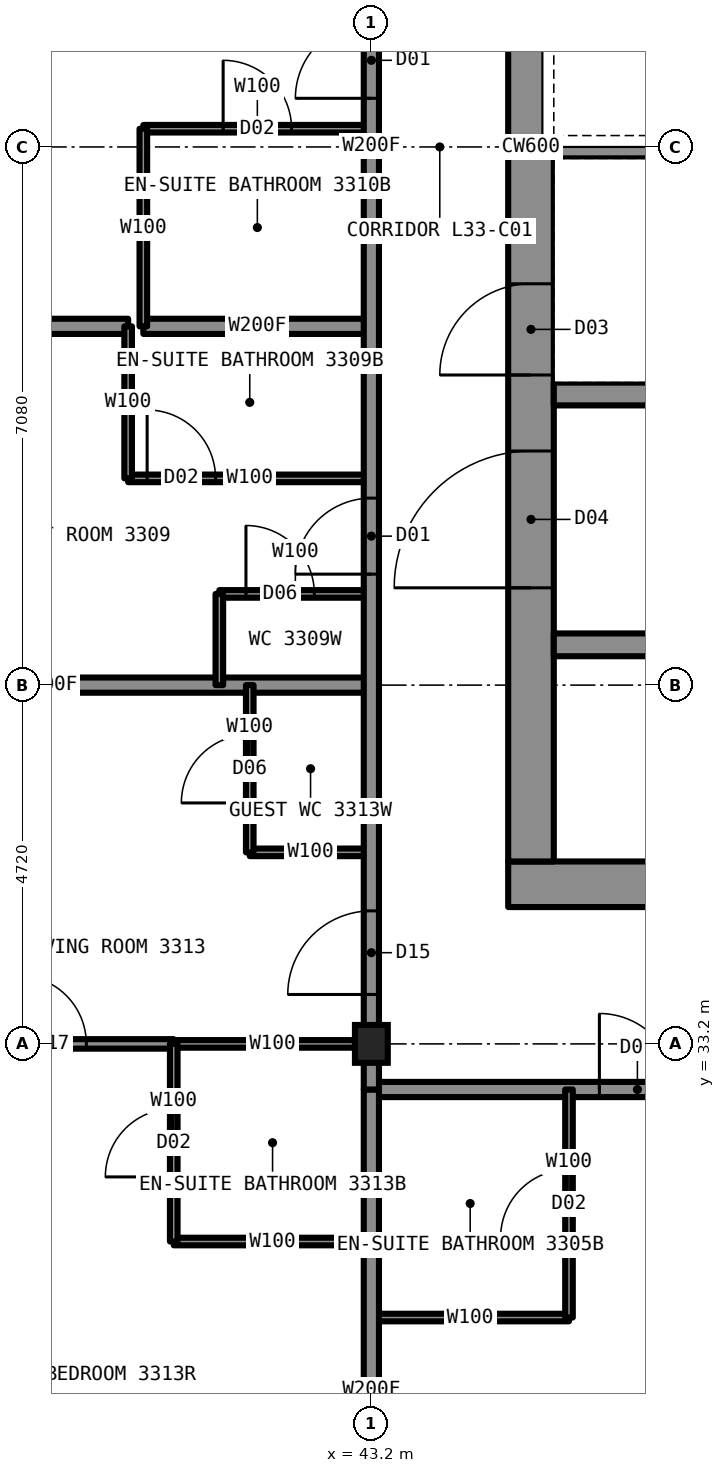
"""IFC4 building model, lengths in metres.
Left out: names, types, materials, properties, quantities, classifications, styles, units other than length and angle.
Written with IfcOpenShell. Run it as: python <this file> out.ifc"""

import sys

from ifc_helpers import new_model, si_unit, direction, frame, frame_2d, origin, origin_2d, place, context, subcontext, project, spatial, rectangle, i_section, extrude, element, fill, save


model = new_model("IFC4")
c1 = context("Model", 3, precision=1e-05, world=origin(), true_north=direction((0.0, 1.0)))
c2 = subcontext(c1, "Body", "Model", "MODEL_VIEW")
j1 = project(units=[si_unit("LENGTHUNIT", "METRE"), si_unit("PLANEANGLEUNIT", "RADIAN")], contexts=[c1])
p1 = place(None, origin())
s1 = spatial("IfcSite", under=j1, at=p1, CompositionType="ELEMENT")
p2 = place(p1, origin())
s2 = spatial("IfcBuilding", under=s1, at=p2, CompositionType="ELEMENT")
p3 = place(p2, frame((0.0, 0.0, 124.9)))
s3 = spatial("IfcBuildingStorey", under=s2, at=p3, CompositionType="ELEMENT", Elevation=124.9)
p4 = place(p3, frame((43.2, 33.2, 0.0), z_axis=(0.0, 0.0, 1.0), x_axis=(1.0, 0.0, 0.0)))
e1 = element("IfcColumn", 1, at=p4, inside=s3, PredefinedType="COLUMN", context=c2, shape_type="SweptSolid", body=[
    extrude(i_section(OverallWidth=0.432, OverallDepth=0.498, WebThickness=0.056, FlangeThickness=0.089, at=origin_2d()), origin(), (0.0, 0.0, 1.0), 3.5),
])
p5 = place(p3, frame((45.0, 35.3, 0.0), z_axis=(0.0, 0.0, 1.0), x_axis=(1.0, 0.0, 0.0)))
e2 = element("IfcWall", 2, at=p5, inside=s3, PredefinedType="SHEAR", context=c2, shape_type="SweptSolid", body=[
    extrude(rectangle(XDim=20.0, YDim=0.6, at=frame_2d((10.0, 0.0))), origin(), (0.0, 0.0, 1.0), 3.5),
])
p6 = place(p3, frame((45.3, 35.6, 0.0), z_axis=(0.0, 0.0, 1.0), x_axis=(0.0, 1.0, 0.0)))
e3 = element("IfcWall", 3, at=p6, inside=s3, PredefinedType="SHEAR", context=c2, shape_type="SweptSolid", body=[
    extrude(rectangle(XDim=18.8, YDim=0.6, at=frame_2d((9.4, 0.0))), origin(), (0.0, 0.0, 1.0), 3.5),
])
p7 = place(p6, frame((13.4, 0.0, 0.0)))
e4 = element("IfcOpeningElement", 4, at=p7, cuts=e3, PredefinedType="OPENING", context=c2, shape_type="SweptSolid", body=[
    extrude(rectangle(XDim=1.8, YDim=2.2, at=frame_2d((0.9, 1.1))), frame((0.0, 0.31, 0.0), z_axis=(0.0, -1.0, 0.0), x_axis=(1.0, 0.0, 0.0)), (0.0, 0.0, 1.0), 0.62),
])
p8 = place(p6, frame((3.6, 0.0, 0.0)))
e5 = element("IfcOpeningElement", 5, at=p8, cuts=e3, PredefinedType="OPENING", context=c2, shape_type="SweptSolid", body=[
    extrude(rectangle(XDim=1.8, YDim=2.2, at=frame_2d((0.9, 1.1))), frame((0.0, 0.31, 0.0), z_axis=(0.0, -1.0, 0.0), x_axis=(1.0, 0.0, 0.0)), (0.0, 0.0, 1.0), 0.62),
])
p9 = place(p6, frame((6.4, 0.0, 0.0)))
e6 = element("IfcOpeningElement", 6, at=p9, cuts=e3, PredefinedType="OPENING", context=c2, shape_type="SweptSolid", body=[
    extrude(rectangle(XDim=1.2, YDim=2.2, at=frame_2d((0.6, 1.1))), frame((0.0, 0.31, 0.0), z_axis=(0.0, -1.0, 0.0), x_axis=(1.0, 0.0, 0.0)), (0.0, 0.0, 1.0), 0.62),
])
p10 = place(p3, frame((45.6, 38.45, 0.0), z_axis=(0.0, 0.0, 1.0), x_axis=(1.0, 0.0, 0.0)))
e7 = element("IfcWall", 7, at=p10, inside=s3, PredefinedType="SHEAR", context=c2, shape_type="SweptSolid", body=[
    extrude(rectangle(XDim=18.8, YDim=0.3, at=frame_2d((9.4, 0.0))), origin(), (0.0, 0.0, 1.0), 3.5),
])
p11 = place(p3, frame((45.6, 41.75, 0.0), z_axis=(0.0, 0.0, 1.0), x_axis=(1.0, 0.0, 0.0)))
e8 = element("IfcWall", 8, at=p11, inside=s3, PredefinedType="SHEAR", context=c2, shape_type="SweptSolid", body=[
    extrude(rectangle(XDim=7.1, YDim=0.3, at=frame_2d((3.55, 0.0))), origin(), (0.0, 0.0, 1.0), 3.5),
])
p12 = place(p3, frame((45.6, 45.0, 0.0), z_axis=(0.0, 0.0, 1.0), x_axis=(1.0, 0.0, 0.0)))
e9 = element("IfcWall", 9, at=p12, inside=s3, PredefinedType="SHEAR", context=c2, shape_type="SweptSolid", body=[
    extrude(rectangle(XDim=6.8, YDim=0.3, at=frame_2d((3.4, 0.0))), origin(), (0.0, 0.0, 1.0), 3.5),
])
p13 = place(p3, frame((40.6, 33.2, 0.0), z_axis=(0.0, 0.0, 1.0), x_axis=(1.0, 0.0, 0.0)))
e10 = element("IfcWall", 10, at=p13, inside=s3, PredefinedType="PARTITIONING", context=c2, shape_type="SweptSolid", body=[
    extrude(rectangle(XDim=2.6, YDim=0.1, at=frame_2d((1.3, 0.0))), origin(), (0.0, 0.0, 1.0), 2.573),
])
p14 = place(p3, frame((34.7, 33.2, 0.0), z_axis=(0.0, 0.0, 1.0), x_axis=(1.0, 0.0, 0.0)))
e11 = element("IfcWall", 11, at=p14, inside=s3, PredefinedType="PARTITIONING", context=c2, shape_type="SweptSolid", body=[
    extrude(rectangle(XDim=5.9, YDim=0.125, at=frame_2d((2.95, 0.0))), origin(), (0.0, 0.0, 1.0), 2.573),
])
p15 = place(p14, frame((3.85, 0.0, 0.0)))
e12 = element("IfcOpeningElement", 12, at=p15, cuts=e11, PredefinedType="OPENING", context=c2, shape_type="SweptSolid", body=[
    extrude(rectangle(XDim=0.9, YDim=2.2, at=frame_2d((0.45, 1.1))), frame((0.0, 0.073, 0.0), z_axis=(0.0, -1.0, 0.0), x_axis=(1.0, 0.0, 0.0)), (0.0, 0.0, 1.0), 0.145),
])
p16 = place(p3, frame((43.2, 32.6, 0.0), z_axis=(0.0, 0.0, 1.0), x_axis=(1.0, 0.0, 0.0)))
e13 = element("IfcWall", 13, at=p16, inside=s3, PredefinedType="PARTITIONING", context=c2, shape_type="SweptSolid", body=[
    extrude(rectangle(XDim=23.6, YDim=0.2, at=frame_2d((11.8, 0.0))), origin(), (0.0, 0.0, 1.0), 3.33),
])
p17 = place(p16, frame((3.0, 0.0, 0.0)))
e14 = element("IfcOpeningElement", 14, at=p17, cuts=e13, PredefinedType="OPENING", context=c2, shape_type="SweptSolid", body=[
    extrude(rectangle(XDim=1.0, YDim=2.2, at=frame_2d((0.5, 1.1))), frame((0.0, 0.11, 0.0), z_axis=(0.0, -1.0, 0.0), x_axis=(1.0, 0.0, 0.0)), (0.0, 0.0, 1.0), 0.22),
])
p18 = place(p16, frame((11.29, 0.0, 0.0)))
e15 = element("IfcOpeningElement", 15, at=p18, cuts=e13, PredefinedType="OPENING", context=c2, shape_type="SweptSolid", body=[
    extrude(rectangle(XDim=1.1, YDim=2.2, at=frame_2d((0.55, 1.1))), frame((0.0, 0.11, 0.0), z_axis=(0.0, -1.0, 0.0), x_axis=(1.0, 0.0, 0.0)), (0.0, 0.0, 1.0), 0.22),
])
p19 = place(p3, frame((40.6, 30.6, 0.0), z_axis=(0.0, 0.0, 1.0), x_axis=(1.0, 0.0, 0.0)))
e16 = element("IfcWall", 16, at=p19, inside=s3, PredefinedType="PARTITIONING", context=c2, shape_type="SweptSolid", body=[
    extrude(rectangle(XDim=2.6, YDim=0.1, at=frame_2d((1.3, 0.0))), origin(), (0.0, 0.0, 1.0), 3.33),
])
p20 = place(p3, frame((43.2, 29.6, 0.0), z_axis=(0.0, 0.0, 1.0), x_axis=(1.0, 0.0, 0.0)))
e17 = element("IfcWall", 17, at=p20, inside=s3, PredefinedType="PARTITIONING", context=c2, shape_type="SweptSolid", body=[
    extrude(rectangle(XDim=2.6, YDim=0.1, at=frame_2d((1.3, 0.0))), origin(), (0.0, 0.0, 1.0), 3.33),
])
p21 = place(p3, frame((34.7, 42.64, 0.0), z_axis=(0.0, 0.0, 1.0), x_axis=(1.0, 0.0, 0.0)))
e18 = element("IfcWall", 18, at=p21, inside=s3, PredefinedType="PARTITIONING", context=c2, shape_type="SweptSolid", body=[
    extrude(rectangle(XDim=5.3, YDim=0.2, at=frame_2d((2.65, 0.0))), origin(), (0.0, 0.0, 1.0), 2.731),
])
p22 = place(p3, frame((40.2, 42.64, 0.0), z_axis=(0.0, 0.0, 1.0), x_axis=(1.0, 0.0, 0.0)))
e19 = element("IfcWall", 19, at=p22, inside=s3, PredefinedType="PARTITIONING", context=c2, shape_type="SweptSolid", body=[
    extrude(rectangle(XDim=3.0, YDim=0.2, at=frame_2d((1.5, 0.0))), origin(), (0.0, 0.0, 1.0), 2.731),
])
p23 = place(p3, frame((40.0, 40.64, 0.0), z_axis=(0.0, 0.0, 1.0), x_axis=(1.0, 0.0, 0.0)))
e20 = element("IfcWall", 20, at=p23, inside=s3, PredefinedType="PARTITIONING", context=c2, shape_type="SweptSolid", body=[
    extrude(rectangle(XDim=3.2, YDim=0.1, at=frame_2d((1.6, 0.0))), origin(), (0.0, 0.0, 1.0), 3.33),
])
p24 = place(p23, frame((0.25, 0.0, 0.0)))
e21 = element("IfcOpeningElement", 21, at=p24, cuts=e20, PredefinedType="OPENING", context=c2, shape_type="SweptSolid", body=[
    extrude(rectangle(XDim=0.9, YDim=2.1, at=frame_2d((0.45, 1.05))), frame((0.0, 0.06, 0.0), z_axis=(0.0, -1.0, 0.0), x_axis=(1.0, 0.0, 0.0)), (0.0, 0.0, 1.0), 0.12),
])
p25 = place(p3, frame((41.2, 39.12, 0.0), z_axis=(0.0, 0.0, 1.0), x_axis=(1.0, 0.0, 0.0)))
e22 = element("IfcWall", 22, at=p25, inside=s3, PredefinedType="PARTITIONING", context=c2, shape_type="SweptSolid", body=[
    extrude(rectangle(XDim=2.0, YDim=0.1, at=frame_2d((1.0, 0.0))), origin(), (0.0, 0.0, 1.0), 3.33),
])
p26 = place(p25, frame((0.35, 0.0, 0.0)))
e23 = element("IfcOpeningElement", 23, at=p26, cuts=e22, PredefinedType="OPENING", context=c2, shape_type="SweptSolid", body=[
    extrude(rectangle(XDim=0.9, YDim=2.1, at=frame_2d((0.45, 1.05))), frame((0.0, 0.06, 0.0), z_axis=(0.0, -1.0, 0.0), x_axis=(1.0, 0.0, 0.0)), (0.0, 0.0, 1.0), 0.12),
])
p27 = place(p3, frame((34.7, 37.92, 0.0), z_axis=(0.0, 0.0, 1.0), x_axis=(1.0, 0.0, 0.0)))
e24 = element("IfcWall", 24, at=p27, inside=s3, PredefinedType="PARTITIONING", context=c2, shape_type="SweptSolid", body=[
    extrude(rectangle(XDim=8.5, YDim=0.2, at=frame_2d((4.25, 0.0))), origin(), (0.0, 0.0, 1.0), 2.573),
])
p28 = place(p3, frame((41.6, 35.72, 0.0), z_axis=(0.0, 0.0, 1.0), x_axis=(1.0, 0.0, 0.0)))
e25 = element("IfcWall", 25, at=p28, inside=s3, PredefinedType="PARTITIONING", context=c2, shape_type="SweptSolid", body=[
    extrude(rectangle(XDim=1.6, YDim=0.1, at=frame_2d((0.8, 0.0))), origin(), (0.0, 0.0, 1.0), 3.33),
])
p29 = place(p3, frame((40.2, 45.24, 0.0), z_axis=(0.0, 0.0, 1.0), x_axis=(1.0, 0.0, 0.0)))
e26 = element("IfcWall", 26, at=p29, inside=s3, PredefinedType="PARTITIONING", context=c2, shape_type="SweptSolid", body=[
    extrude(rectangle(XDim=3.0, YDim=0.1, at=frame_2d((1.5, 0.0))), origin(), (0.0, 0.0, 1.0), 3.33),
])
p30 = place(p29, frame((1.05, 0.0, 0.0)))
e27 = element("IfcOpeningElement", 27, at=p30, cuts=e26, PredefinedType="OPENING", context=c2, shape_type="SweptSolid", body=[
    extrude(rectangle(XDim=0.9, YDim=2.1, at=frame_2d((0.45, 1.05))), frame((0.0, 0.06, 0.0), z_axis=(0.0, -1.0, 0.0), x_axis=(1.0, 0.0, 0.0)), (0.0, 0.0, 1.0), 0.12),
])
p31 = place(p3, frame((43.2, 33.22, 0.0), z_axis=(0.0, 0.0, 1.0), x_axis=(0.0, 1.0, 0.0)))
e28 = element("IfcWall", 28, at=p31, inside=s3, PredefinedType="PARTITIONING", context=c2, shape_type="SweptSolid", body=[
    extrude(rectangle(XDim=23.58, YDim=0.2, at=frame_2d((11.79, 0.0))), origin(), (0.0, 0.0, 1.0), 3.33),
])
p32 = place(p31, frame((6.16, 0.0, 0.0)))
e29 = element("IfcOpeningElement", 29, at=p32, cuts=e28, PredefinedType="OPENING", context=c2, shape_type="SweptSolid", body=[
    extrude(rectangle(XDim=1.0, YDim=2.2, at=frame_2d((0.5, 1.1))), frame((0.0, 0.11, 0.0), z_axis=(0.0, -1.0, 0.0), x_axis=(1.0, 0.0, 0.0)), (0.0, 0.0, 1.0), 0.22),
])
p33 = place(p31, frame((12.42, 0.0, 0.0)))
e30 = element("IfcOpeningElement", 30, at=p33, cuts=e28, PredefinedType="OPENING", context=c2, shape_type="SweptSolid", body=[
    extrude(rectangle(XDim=1.0, YDim=2.2, at=frame_2d((0.5, 1.1))), frame((0.0, 0.11, 0.0), z_axis=(0.0, -1.0, 0.0), x_axis=(1.0, 0.0, 0.0)), (0.0, 0.0, 1.0), 0.22),
])
p34 = place(p31, frame((21.83, 0.0, 0.0)))
e31 = element("IfcOpeningElement", 31, at=p34, cuts=e28, PredefinedType="OPENING", context=c2, shape_type="SweptSolid", body=[
    extrude(rectangle(XDim=1.1, YDim=2.2, at=frame_2d((0.55, 1.1))), frame((0.0, 0.11, 0.0), z_axis=(0.0, -1.0, 0.0), x_axis=(1.0, 0.0, 0.0)), (0.0, 0.0, 1.0), 0.22),
])
p35 = place(p31, frame((0.63, 0.0, 0.0)))
e32 = element("IfcOpeningElement", 32, at=p35, cuts=e28, PredefinedType="OPENING", context=c2, shape_type="SweptSolid", body=[
    extrude(rectangle(XDim=1.1, YDim=2.2, at=frame_2d((0.55, 1.1))), frame((0.0, 0.11, 0.0), z_axis=(0.0, -1.0, 0.0), x_axis=(1.0, 0.0, 0.0)), (0.0, 0.0, 1.0), 0.22),
])
p36 = place(p3, frame((43.2, 24.7, 0.0), z_axis=(0.0, 0.0, 1.0), x_axis=(0.0, 1.0, 0.0)))
e33 = element("IfcWall", 33, at=p36, inside=s3, PredefinedType="PARTITIONING", context=c2, shape_type="SweptSolid", body=[
    extrude(rectangle(XDim=7.9, YDim=0.2, at=frame_2d((3.95, 0.0))), origin(), (0.0, 0.0, 1.0), 2.573),
])
p37 = place(p3, frame((41.6, 35.72, 0.0), z_axis=(0.0, 0.0, 1.0), x_axis=(0.0, 1.0, 0.0)))
e34 = element("IfcWall", 34, at=p37, inside=s3, PredefinedType="PARTITIONING", context=c2, shape_type="SweptSolid", body=[
    extrude(rectangle(XDim=2.2, YDim=0.1, at=frame_2d((1.1, 0.0))), origin(), (0.0, 0.0, 1.0), 3.33),
])
p38 = place(p37, frame((0.65, 0.0, 0.0)))
e35 = element("IfcOpeningElement", 35, at=p38, cuts=e34, PredefinedType="OPENING", context=c2, shape_type="SweptSolid", body=[
    extrude(rectangle(XDim=0.9, YDim=2.1, at=frame_2d((0.45, 1.05))), frame((0.0, 0.06, 0.0), z_axis=(0.0, -1.0, 0.0), x_axis=(1.0, 0.0, 0.0)), (0.0, 0.0, 1.0), 0.12),
])
p39 = place(p3, frame((41.2, 37.92, 0.0), z_axis=(0.0, 0.0, 1.0), x_axis=(0.0, 1.0, 0.0)))
e36 = element("IfcWall", 36, at=p39, inside=s3, PredefinedType="PARTITIONING", context=c2, shape_type="SweptSolid", body=[
    extrude(rectangle(XDim=1.2, YDim=0.1, at=frame_2d((0.6, 0.0))), origin(), (0.0, 0.0, 1.0), 3.33),
])
p40 = place(p3, frame((40.6, 30.6, 0.0), z_axis=(0.0, 0.0, 1.0), x_axis=(0.0, 1.0, 0.0)))
e37 = element("IfcWall", 37, at=p40, inside=s3, PredefinedType="PARTITIONING", context=c2, shape_type="SweptSolid", body=[
    extrude(rectangle(XDim=2.6, YDim=0.1, at=frame_2d((1.3, 0.0))), origin(), (0.0, 0.0, 1.0), 3.33),
])
p41 = place(p40, frame((0.85, 0.0, 0.0)))
e38 = element("IfcOpeningElement", 38, at=p41, cuts=e37, PredefinedType="OPENING", context=c2, shape_type="SweptSolid", body=[
    extrude(rectangle(XDim=0.9, YDim=2.1, at=frame_2d((0.45, 1.05))), frame((0.0, 0.06, 0.0), z_axis=(0.0, -1.0, 0.0), x_axis=(1.0, 0.0, 0.0)), (0.0, 0.0, 1.0), 0.12),
])
p42 = place(p3, frame((40.2, 42.64, 0.0), z_axis=(0.0, 0.0, 1.0), x_axis=(0.0, 1.0, 0.0)))
e39 = element("IfcWall", 39, at=p42, inside=s3, PredefinedType="PARTITIONING", context=c2, shape_type="SweptSolid", body=[
    extrude(rectangle(XDim=2.6, YDim=0.1, at=frame_2d((1.3, 0.0))), origin(), (0.0, 0.0, 1.0), 3.33),
])
p43 = place(p3, frame((40.0, 40.64, 0.0), z_axis=(0.0, 0.0, 1.0), x_axis=(0.0, 1.0, 0.0)))
e40 = element("IfcWall", 40, at=p43, inside=s3, PredefinedType="PARTITIONING", context=c2, shape_type="SweptSolid", body=[
    extrude(rectangle(XDim=2.0, YDim=0.1, at=frame_2d((1.0, 0.0))), origin(), (0.0, 0.0, 1.0), 3.33),
])
p44 = place(p3, frame((45.8, 29.6, 0.0), z_axis=(0.0, 0.0, 1.0), x_axis=(0.0, 1.0, 0.0)))
e41 = element("IfcWall", 41, at=p44, inside=s3, PredefinedType="PARTITIONING", context=c2, shape_type="SweptSolid", body=[
    extrude(rectangle(XDim=3.0, YDim=0.1, at=frame_2d((1.5, 0.0))), origin(), (0.0, 0.0, 1.0), 3.33),
])
p45 = place(p44, frame((1.05, 0.0, 0.0)))
e42 = element("IfcOpeningElement", 42, at=p45, cuts=e41, PredefinedType="OPENING", context=c2, shape_type="SweptSolid", body=[
    extrude(rectangle(XDim=0.9, YDim=2.1, at=frame_2d((0.45, 1.05))), frame((0.0, 0.06, 0.0), z_axis=(0.0, -1.0, 0.0), x_axis=(1.0, 0.0, 0.0)), (0.0, 0.0, 1.0), 0.12),
])
p46 = place(p3, frame((43.2, 32.6, 0.0), z_axis=(0.0, 0.0, 1.0), x_axis=(0.0, 1.0, 0.0)))
e43 = element("IfcWall", 43, at=p46, inside=s3, PredefinedType="PARTITIONING", context=c2, shape_type="SweptSolid", body=[
    extrude(rectangle(XDim=0.62, YDim=0.2, at=frame_2d((0.31, 0.0))), origin(), (0.0, 0.0, 1.0), 2.573),
])
p47 = place(p17, origin())
e44 = element("IfcDoor", 44, at=p47, inside=s3, OperationType="SINGLE_SWING_LEFT", PredefinedType="DOOR", context=c2, shape_type="SweptSolid", body=[
    extrude(rectangle(XDim=1.0, YDim=2.2, at=frame_2d((0.5, 1.1))), frame((0.0, 0.025, 0.0), z_axis=(0.0, -1.0, 0.0), x_axis=(1.0, 0.0, 0.0)), (0.0, 0.0, 1.0), 0.05),
])
fill(e14, e44)
p48 = place(p45, origin())
e45 = element("IfcDoor", 45, at=p48, inside=s3, OperationType="SINGLE_SWING_RIGHT", PredefinedType="DOOR", context=c2, shape_type="SweptSolid", body=[
    extrude(rectangle(XDim=0.9, YDim=2.1, at=frame_2d((0.45, 1.05))), frame((0.0, 0.025, 0.0), z_axis=(0.0, -1.0, 0.0), x_axis=(1.0, 0.0, 0.0)), (0.0, 0.0, 1.0), 0.05),
])
fill(e42, e45)
p49 = place(p32, origin())
e46 = element("IfcDoor", 46, at=p49, inside=s3, OperationType="SINGLE_SWING_LEFT", PredefinedType="DOOR", context=c2, shape_type="SweptSolid", body=[
    extrude(rectangle(XDim=1.0, YDim=2.2, at=frame_2d((0.5, 1.1))), frame((0.0, 0.025, 0.0), z_axis=(0.0, -1.0, 0.0), x_axis=(1.0, 0.0, 0.0)), (0.0, 0.0, 1.0), 0.05),
])
fill(e29, e46)
p50 = place(p24, origin())
e47 = element("IfcDoor", 47, at=p50, inside=s3, OperationType="SINGLE_SWING_RIGHT", PredefinedType="DOOR", context=c2, shape_type="SweptSolid", body=[
    extrude(rectangle(XDim=0.9, YDim=2.1, at=frame_2d((0.45, 1.05))), frame((0.0, 0.025, 0.0), z_axis=(0.0, -1.0, 0.0), x_axis=(1.0, 0.0, 0.0)), (0.0, 0.0, 1.0), 0.05),
])
fill(e21, e47)
p51 = place(p26, origin())
e48 = element("IfcDoor", 48, at=p51, inside=s3, OperationType="SINGLE_SWING_LEFT", PredefinedType="DOOR", context=c2, shape_type="SweptSolid", body=[
    extrude(rectangle(XDim=0.9, YDim=2.1, at=frame_2d((0.45, 1.05))), frame((0.0, 0.025, 0.0), z_axis=(0.0, -1.0, 0.0), x_axis=(1.0, 0.0, 0.0)), (0.0, 0.0, 1.0), 0.05),
])
fill(e23, e48)
p52 = place(p33, origin())
e49 = element("IfcDoor", 49, at=p52, inside=s3, OperationType="SINGLE_SWING_LEFT", PredefinedType="DOOR", context=c2, shape_type="SweptSolid", body=[
    extrude(rectangle(XDim=1.0, YDim=2.2, at=frame_2d((0.5, 1.1))), frame((0.0, 0.025, 0.0), z_axis=(0.0, -1.0, 0.0), x_axis=(1.0, 0.0, 0.0)), (0.0, 0.0, 1.0), 0.05),
])
fill(e30, e49)
p53 = place(p30, origin())
e50 = element("IfcDoor", 50, at=p53, inside=s3, OperationType="SINGLE_SWING_RIGHT", PredefinedType="DOOR", context=c2, shape_type="SweptSolid", body=[
    extrude(rectangle(XDim=0.9, YDim=2.1, at=frame_2d((0.45, 1.05))), frame((0.0, 0.025, 0.0), z_axis=(0.0, -1.0, 0.0), x_axis=(1.0, 0.0, 0.0)), (0.0, 0.0, 1.0), 0.05),
])
fill(e27, e50)
p54 = place(p35, origin())
e51 = element("IfcDoor", 51, at=p54, inside=s3, OperationType="SINGLE_SWING_LEFT", PredefinedType="DOOR", context=c2, shape_type="SweptSolid", body=[
    extrude(rectangle(XDim=1.1, YDim=2.2, at=frame_2d((0.55, 1.1))), frame((0.0, 0.025, 0.0), z_axis=(0.0, -1.0, 0.0), x_axis=(1.0, 0.0, 0.0)), (0.0, 0.0, 1.0), 0.05),
])
fill(e32, e51)
p55 = place(p41, origin())
e52 = element("IfcDoor", 52, at=p55, inside=s3, OperationType="SINGLE_SWING_RIGHT", PredefinedType="DOOR", context=c2, shape_type="SweptSolid", body=[
    extrude(rectangle(XDim=0.9, YDim=2.1, at=frame_2d((0.45, 1.05))), frame((0.0, 0.025, 0.0), z_axis=(0.0, -1.0, 0.0), x_axis=(1.0, 0.0, 0.0)), (0.0, 0.0, 1.0), 0.05),
])
fill(e38, e52)
p56 = place(p15, origin())
e53 = element("IfcDoor", 53, at=p56, inside=s3, OperationType="SINGLE_SWING_LEFT", PredefinedType="DOOR", context=c2, shape_type="SweptSolid", body=[
    extrude(rectangle(XDim=0.9, YDim=2.2, at=frame_2d((0.45, 1.1))), frame((0.0, 0.025, 0.0), z_axis=(0.0, -1.0, 0.0), x_axis=(1.0, 0.0, 0.0)), (0.0, 0.0, 1.0), 0.05),
])
fill(e12, e53)
p57 = place(p38, origin())
e54 = element("IfcDoor", 54, at=p57, inside=s3, OperationType="SINGLE_SWING_LEFT", PredefinedType="DOOR", context=c2, shape_type="SweptSolid", body=[
    extrude(rectangle(XDim=0.9, YDim=2.1, at=frame_2d((0.45, 1.05))), frame((0.0, 0.025, 0.0), z_axis=(0.0, -1.0, 0.0), x_axis=(1.0, 0.0, 0.0)), (0.0, 0.0, 1.0), 0.05),
])
fill(e35, e54)
p58 = place(p8, origin())
e55 = element("IfcDoor", 55, at=p58, inside=s3, OperationType="DOUBLE_DOOR_SINGLE_SWING", PredefinedType="DOOR", context=c2, shape_type="SweptSolid", body=[
    extrude(rectangle(XDim=1.8, YDim=2.2, at=frame_2d((0.9, 1.1))), frame((0.0, 0.025, 0.0), z_axis=(0.0, -1.0, 0.0), x_axis=(1.0, 0.0, 0.0)), (0.0, 0.0, 1.0), 0.05),
])
fill(e5, e55)
p59 = place(p9, origin())
e56 = element("IfcDoor", 56, at=p59, inside=s3, OperationType="SINGLE_SWING_LEFT", PredefinedType="DOOR", context=c2, shape_type="SweptSolid", body=[
    extrude(rectangle(XDim=1.2, YDim=2.2, at=frame_2d((0.6, 1.1))), frame((0.0, 0.025, 0.0), z_axis=(0.0, -1.0, 0.0), x_axis=(1.0, 0.0, 0.0)), (0.0, 0.0, 1.0), 0.05),
])
fill(e6, e56)
save(model, sys.argv[1])
